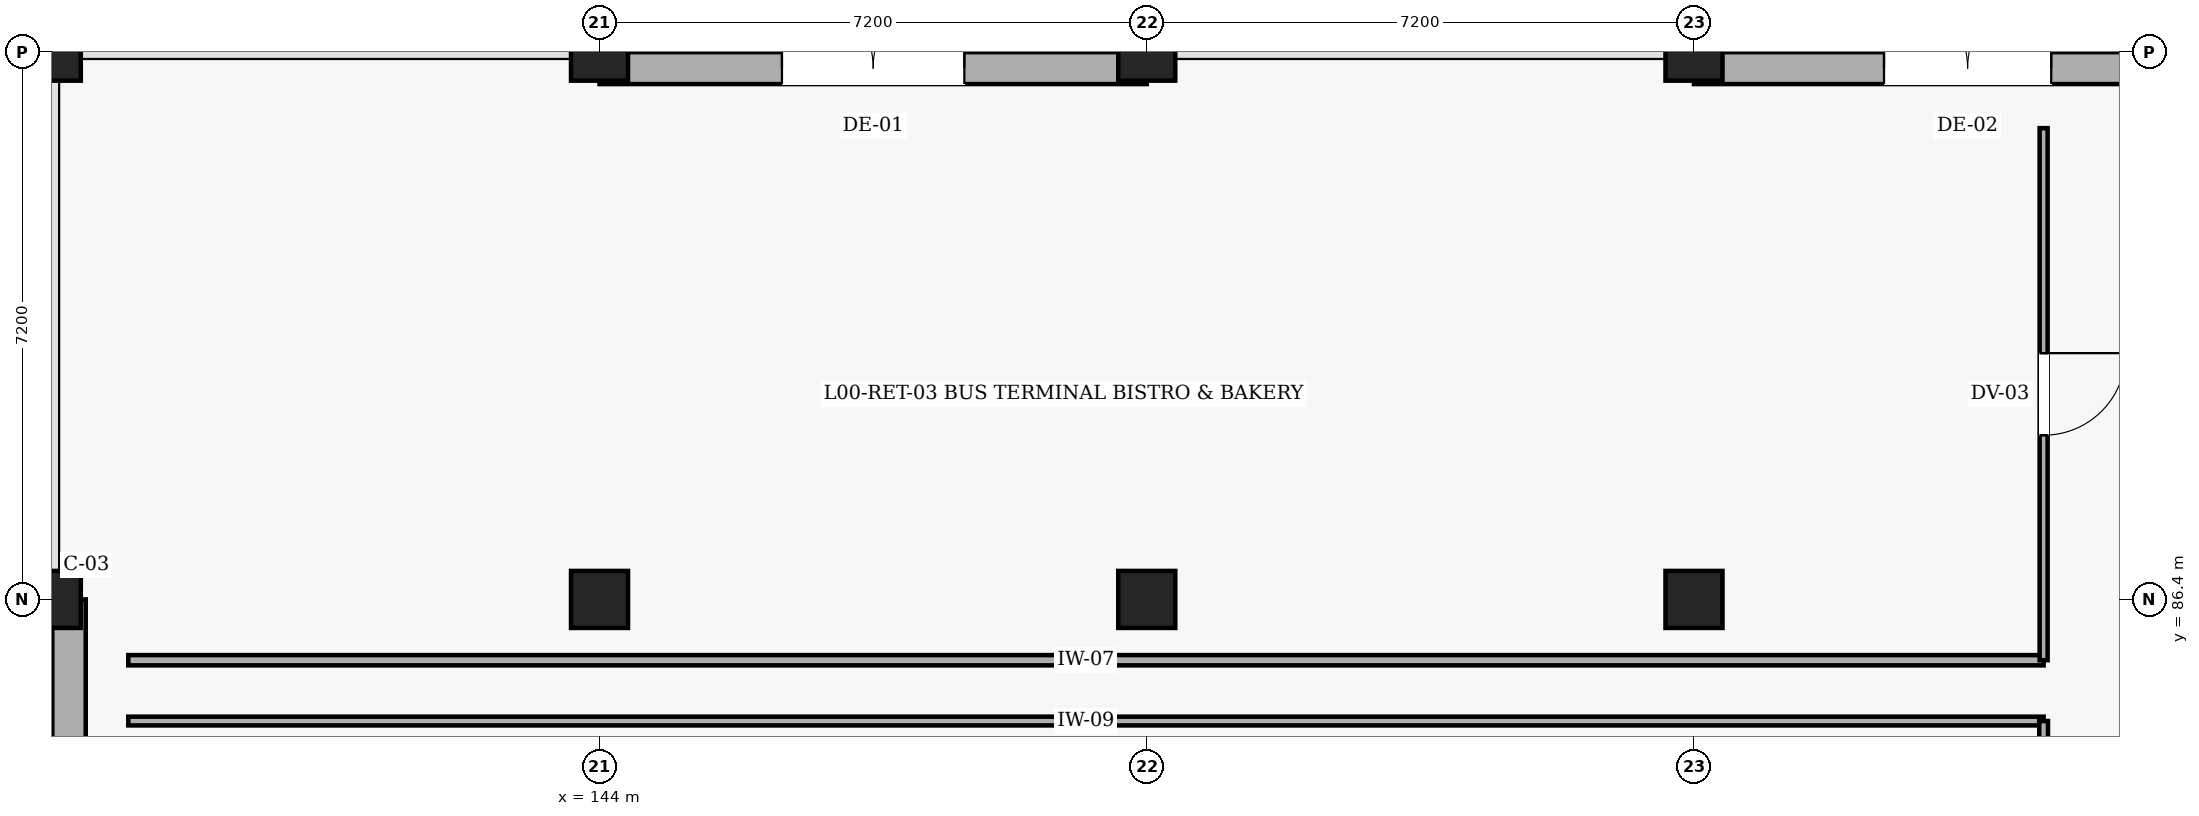
"""IFC4 building model, lengths in metres.
Left out: names, types, materials, properties, quantities, classifications, styles, units other than length and angle.
Written with IfcOpenShell. Run it as: python <this file> out.ifc"""

import sys

from ifc_helpers import new_model, si_unit, direction, frame, frame_2d, origin, origin_2d, place, context, subcontext, project, spatial, rectangle, extrude, element, fill, save


model = new_model("IFC4")
c1 = context("Model", 3, precision=1e-05, world=origin(), true_north=direction((0.0, 1.0)))
c2 = subcontext(c1, "Body", "Model", "MODEL_VIEW")
j1 = project(units=[si_unit("LENGTHUNIT", "METRE"), si_unit("PLANEANGLEUNIT", "RADIAN")], contexts=[c1])
p1 = place(None, origin())
s1 = spatial("IfcSite", under=j1, at=p1, CompositionType="ELEMENT")
p2 = place(p1, origin())
s2 = spatial("IfcBuilding", under=s1, at=p2, CompositionType="ELEMENT")
p3 = place(p2, origin())
s3 = spatial("IfcBuildingStorey", under=s2, at=p3, CompositionType="ELEMENT", Elevation=0.0)
for number, where, z_axis, x_axis in (
    (1, (136.8, 86.4, 0.0), (0.0, 0.0, 1.0), (1.0, 0.0, 0.0)),
    (2, (136.8, 93.6, 0.0), (0.0, 0.0, 1.0), (1.0, 0.0, 0.0)),
    (3, (144.0, 86.4, 0.0), (0.0, 0.0, 1.0), (1.0, 0.0, 0.0)),
    (4, (144.0, 93.6, 0.0), (0.0, 0.0, 1.0), (1.0, 0.0, 0.0)),
    (5, (151.2, 86.4, 0.0), (0.0, 0.0, 1.0), (1.0, 0.0, 0.0)),
    (6, (151.2, 93.6, 0.0), (0.0, 0.0, 1.0), (1.0, 0.0, 0.0)),
    (7, (158.4, 86.4, 0.0), (0.0, 0.0, 1.0), (1.0, 0.0, 0.0)),
    (8, (158.4, 93.6, 0.0), (0.0, 0.0, 1.0), (1.0, 0.0, 0.0)),
):
    element("IfcColumn", number, at=place(p3, frame(where, z_axis=z_axis, x_axis=x_axis)), inside=s3, PredefinedType="COLUMN", context=c2, shape_type="SweptSolid", body=[
        extrude(rectangle(XDim=0.75, YDim=0.75, at=origin_2d()), origin(), (0.0, 0.0, 1.0), 5.1),
    ])
p4 = place(p3, frame((144.0, 93.39, 0.0), z_axis=(0.0, 0.0, 1.0), x_axis=(1.0, 0.0, 0.0)))
e9 = element("IfcWall", 9, at=p4, inside=s3, PredefinedType="SOLIDWALL", context=c2, shape_type="SweptSolid", body=[
    extrude(rectangle(XDim=7.2, YDim=0.42, at=frame_2d((3.6, 0.0))), origin(), (0.0, 0.0, 1.0), 4.8),
])
p5 = place(p4, frame((2.4, 0.0, 0.0)))
e10 = element("IfcOpeningElement", 10, at=p5, cuts=e9, PredefinedType="OPENING", context=c2, shape_type="SweptSolid", body=[
    extrude(rectangle(XDim=2.4, YDim=2.5, at=frame_2d((1.2, 1.25))), frame((0.0, 0.22, 0.0), z_axis=(0.0, -1.0, 0.0), x_axis=(1.0, 0.0, 0.0)), (0.0, 0.0, 1.0), 0.44),
])
p6 = place(p3, frame((158.4, 93.39, 0.0), z_axis=(0.0, 0.0, 1.0), x_axis=(1.0, 0.0, 0.0)))
e11 = element("IfcWall", 11, at=p6, inside=s3, PredefinedType="SOLIDWALL", context=c2, shape_type="SweptSolid", body=[
    extrude(rectangle(XDim=7.2, YDim=0.42, at=frame_2d((3.6, 0.0))), origin(), (0.0, 0.0, 1.0), 4.8),
])
p7 = place(p6, frame((2.5, 0.0, 0.0)))
e12 = element("IfcOpeningElement", 12, at=p7, cuts=e11, PredefinedType="OPENING", context=c2, shape_type="SweptSolid", body=[
    extrude(rectangle(XDim=2.2, YDim=2.4, at=frame_2d((1.1, 1.2))), frame((0.0, 0.22, 0.0), z_axis=(0.0, -1.0, 0.0), x_axis=(1.0, 0.0, 0.0)), (0.0, 0.0, 1.0), 0.44),
])
p8 = place(p3, frame((137.02, 79.2, 0.0), z_axis=(0.0, 0.0, 1.0), x_axis=(0.0, 1.0, 0.0)))
e13 = element("IfcWall", 13, at=p8, inside=s3, PredefinedType="SOLIDWALL", context=c2, shape_type="SweptSolid", body=[
    extrude(rectangle(XDim=7.2, YDim=0.44, at=frame_2d((3.6, 0.0))), origin(), (0.0, 0.0, 1.0), 4.77),
])
p9 = place(p8, frame((2.275, 0.0, 0.9)))
e14 = element("IfcOpeningElement", 14, at=p9, cuts=e13, PredefinedType="OPENING", context=c2, shape_type="SweptSolid", body=[
    extrude(rectangle(XDim=2.65, YDim=1.7, at=frame_2d((1.325, 0.85))), frame((0.0, 0.23, 0.0), z_axis=(0.0, -1.0, 0.0), x_axis=(1.0, 0.0, 0.0)), (0.0, 0.0, 1.0), 0.46),
])
p10 = place(p3, frame((137.8, 84.8, 0.0), z_axis=(0.0, 0.0, 1.0), x_axis=(1.0, 0.0, 0.0)))
e15 = element("IfcWall", 15, at=p10, inside=s3, PredefinedType="PARTITIONING", context=c2, shape_type="SweptSolid", body=[
    extrude(rectangle(XDim=25.2, YDim=0.115, at=frame_2d((12.6, 0.0))), origin(), (0.0, 0.0, 1.0), 4.7),
])
p11 = place(p3, frame((163.0, 84.8, 0.0), z_axis=(0.0, 0.0, 1.0), x_axis=(0.0, -1.0, 0.0)))
e16 = element("IfcWall", 16, at=p11, inside=s3, PredefinedType="PARTITIONING", context=c2, shape_type="SweptSolid", body=[
    extrude(rectangle(XDim=12.0, YDim=0.115, at=frame_2d((6.0, 0.0))), origin(), (0.0, 0.0, 1.0), 4.6),
])
p12 = place(p11, frame((5.51, 0.0, 0.0)))
e17 = element("IfcOpeningElement", 17, at=p12, cuts=e16, PredefinedType="OPENING", context=c2, shape_type="SweptSolid", body=[
    extrude(rectangle(XDim=0.98, YDim=2.15, at=frame_2d((0.49, 1.075))), frame((0.0, 0.067, 0.0), z_axis=(0.0, -1.0, 0.0), x_axis=(1.0, 0.0, 0.0)), (0.0, 0.0, 1.0), 0.135),
])
p13 = place(p3, frame((163.0, 85.6, 0.0), z_axis=(0.0, 0.0, 1.0), x_axis=(-1.0, 0.0, 0.0)))
e18 = element("IfcWall", 18, at=p13, inside=s3, PredefinedType="PARTITIONING", context=c2, shape_type="SweptSolid", body=[
    extrude(rectangle(XDim=25.2, YDim=0.135, at=frame_2d((12.6, 0.0))), origin(), (0.0, 0.0, 1.0), 4.7),
])
p14 = place(p3, frame((163.0, 92.6, 0.0), z_axis=(0.0, 0.0, 1.0), x_axis=(0.0, -1.0, 0.0)))
e19 = element("IfcWall", 19, at=p14, inside=s3, PredefinedType="PARTITIONING", context=c2, shape_type="SweptSolid", body=[
    extrude(rectangle(XDim=7.0, YDim=0.105, at=frame_2d((3.5, 0.0))), origin(), (0.0, 0.0, 1.0), 4.6),
])
p15 = place(p14, frame((2.96, 0.0, 0.0)))
e20 = element("IfcOpeningElement", 20, at=p15, cuts=e19, PredefinedType="OPENING", context=c2, shape_type="SweptSolid", body=[
    extrude(rectangle(XDim=1.08, YDim=2.15, at=frame_2d((0.54, 1.075))), frame((0.0, 0.062, 0.0), z_axis=(0.0, -1.0, 0.0), x_axis=(1.0, 0.0, 0.0)), (0.0, 0.0, 1.0), 0.125),
])
p16 = place(p5, origin())
e21 = element("IfcDoor", 21, at=p16, inside=s3, OperationType="DOUBLE_DOOR_SINGLE_SWING", PredefinedType="DOOR", context=c2, shape_type="SweptSolid", body=[
    extrude(rectangle(XDim=2.4, YDim=2.5, at=frame_2d((1.2, 1.25))), frame((0.0, 0.025, 0.0), z_axis=(0.0, -1.0, 0.0), x_axis=(1.0, 0.0, 0.0)), (0.0, 0.0, 1.0), 0.05),
])
fill(e10, e21)
p17 = place(p7, origin())
e22 = element("IfcDoor", 22, at=p17, inside=s3, OperationType="DOUBLE_DOOR_SINGLE_SWING", PredefinedType="DOOR", context=c2, shape_type="SweptSolid", body=[
    extrude(rectangle(XDim=2.2, YDim=2.4, at=frame_2d((1.1, 1.2))), frame((0.0, 0.025, 0.0), z_axis=(0.0, -1.0, 0.0), x_axis=(1.0, 0.0, 0.0)), (0.0, 0.0, 1.0), 0.05),
])
fill(e12, e22)
p18 = place(p15, origin())
e23 = element("IfcDoor", 23, at=p18, inside=s3, OperationType="SINGLE_SWING_LEFT", PredefinedType="DOOR", context=c2, shape_type="SweptSolid", body=[
    extrude(rectangle(XDim=1.08, YDim=2.15, at=frame_2d((0.54, 1.075))), frame((0.0, 0.025, 0.0), z_axis=(0.0, -1.0, 0.0), x_axis=(1.0, 0.0, 0.0)), (0.0, 0.0, 1.0), 0.05),
])
fill(e20, e23)
save(model, sys.argv[1])
